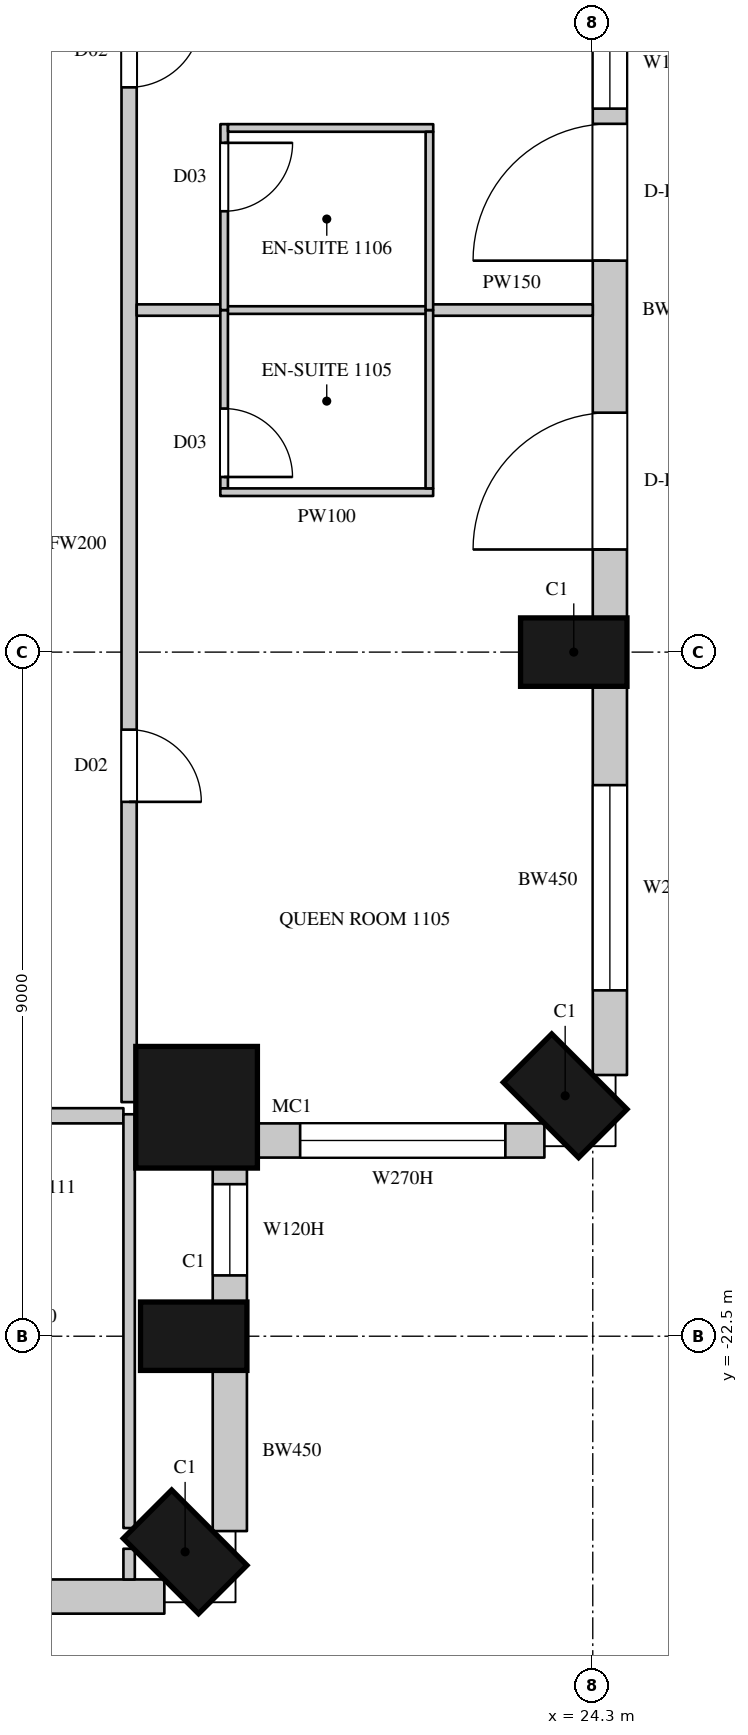
"""IFC4 building model, lengths in metres.
Left out: names, types, materials, properties, quantities, classifications, styles, units other than length and angle.
Written with IfcOpenShell. Run it as: python <this file> out.ifc"""

import sys

from ifc_helpers import new_model, si_unit, direction, frame, frame_2d, origin, origin_2d, place, context, subcontext, project, spatial, rectangle, circle, extrude, element, fill, save


model = new_model("IFC4")
c1 = context("Model", 3, precision=1e-05, world=origin(), true_north=direction((0.0, 1.0)))
c2 = subcontext(c1, "Body", "Model", "MODEL_VIEW")
j1 = project(units=[si_unit("LENGTHUNIT", "METRE"), si_unit("PLANEANGLEUNIT", "RADIAN")], contexts=[c1])
p1 = place(None, origin())
s1 = spatial("IfcSite", under=j1, at=p1, CompositionType="ELEMENT")
p2 = place(p1, origin())
s2 = spatial("IfcBuilding", under=s1, at=p2, CompositionType="ELEMENT")
p3 = place(p2, frame((0.0, 0.0, 69.9)))
s3 = spatial("IfcBuildingStorey", under=s2, at=p3, CompositionType="ELEMENT", Elevation=69.9)
for number, where, z_axis, x_axis in (
    (1, (18.937, -25.337, 0.0), (0.0, 0.0, 1.0), (0.707, 0.707, 0.0)),
    (2, (19.05, -22.5, 0.0), (0.0, 0.0, 1.0), (0.0, 1.0, 0.0)),
):
    element("IfcColumn", number, at=place(p3, frame(where, z_axis=z_axis, x_axis=x_axis)), inside=s3, PredefinedType="COLUMN", context=c2, shape_type="SweptSolid", body=[
        extrude(rectangle(XDim=0.9, YDim=1.4, at=origin_2d()), origin(), (0.0, 0.0, 1.0), 3.6),
    ])
p4 = place(p3, frame((19.088, -19.488, 0.0), z_axis=(0.0, 0.0, 1.0), x_axis=(1.0, 0.0, 0.0)))
e3 = element("IfcColumn", 3, at=p4, inside=s3, PredefinedType="COLUMN", context=c2, shape_type="SweptSolid", body=[
    extrude(circle(Radius=0.8, at=origin_2d()), origin(), (0.0, 0.0, 1.0), 3.6),
])
for number, where, z_axis, x_axis in (
    (4, (23.937, -19.337, 0.0), (0.0, 0.0, 1.0), (0.707, 0.707, 0.0)),
    (5, (24.05, -13.5, 0.0), (0.0, 0.0, 1.0), (0.0, 1.0, 0.0)),
):
    element("IfcColumn", number, at=place(p3, frame(where, z_axis=z_axis, x_axis=x_axis)), inside=s3, PredefinedType="COLUMN", context=c2, shape_type="SweptSolid", body=[
        extrude(rectangle(XDim=0.9, YDim=1.4, at=origin_2d()), origin(), (0.0, 0.0, 1.0), 3.6),
    ])
p5 = place(p3, frame((15.75, -25.925, 0.0), z_axis=(0.0, 0.0, 1.0), x_axis=(1.0, 0.0, 0.0)))
e6 = element("IfcWall", 6, at=p5, inside=s3, PredefinedType="SOLIDWALL", context=c2, shape_type="SweptSolid", body=[
    extrude(rectangle(XDim=2.914, YDim=0.45, at=frame_2d((1.457, 0.0))), origin(), (0.0, 0.0, 1.0), 3.3),
])
p6 = place(p3, frame((19.525, -25.064, 0.0), z_axis=(0.0, 0.0, 1.0), x_axis=(0.0, 1.0, 0.0)))
e7 = element("IfcWall", 7, at=p6, inside=s3, PredefinedType="SOLIDWALL", context=c2, shape_type="SweptSolid", body=[
    extrude(rectangle(XDim=2.114, YDim=0.45, at=frame_2d((1.057, 0.0))), origin(), (0.0, 0.0, 1.0), 3.3),
])
p7 = place(p3, frame((19.525, -22.05, 0.0), z_axis=(0.0, 0.0, 1.0), x_axis=(0.0, 1.0, 0.0)))
e8 = element("IfcWall", 8, at=p7, inside=s3, PredefinedType="SOLIDWALL", context=c2, shape_type="SweptSolid", body=[
    extrude(rectangle(XDim=1.792, YDim=0.45, at=frame_2d((0.896, 0.0))), origin(), (0.0, 0.0, 1.0), 3.3),
])
p8 = place(p7, frame((0.35, 0.0, 1.05)))
e9 = element("IfcOpeningElement", 9, at=p8, cuts=e8, PredefinedType="OPENING", context=c2, shape_type="SweptSolid", body=[
    extrude(rectangle(XDim=1.2, YDim=2.0, at=frame_2d((0.6, 1.0))), frame((0.0, 0.235, 0.0), z_axis=(0.0, -1.0, 0.0), x_axis=(1.0, 0.0, 0.0)), (0.0, 0.0, 1.0), 0.47),
])
p9 = place(p3, frame((19.858, -19.925, 0.0), z_axis=(0.0, 0.0, 1.0), x_axis=(1.0, 0.0, 0.0)))
e10 = element("IfcWall", 10, at=p9, inside=s3, PredefinedType="SOLIDWALL", context=c2, shape_type="SweptSolid", body=[
    extrude(rectangle(XDim=3.805, YDim=0.45, at=frame_2d((1.903, 0.0))), origin(), (0.0, 0.0, 1.0), 3.3),
])
p10 = place(p9, frame((0.592, 0.0, 1.05)))
e11 = element("IfcOpeningElement", 11, at=p10, cuts=e10, PredefinedType="OPENING", context=c2, shape_type="SweptSolid", body=[
    extrude(rectangle(XDim=2.7, YDim=2.0, at=frame_2d((1.35, 1.0))), frame((0.0, 0.235, 0.0), z_axis=(0.0, -1.0, 0.0), x_axis=(1.0, 0.0, 0.0)), (0.0, 0.0, 1.0), 0.47),
])
p11 = place(p3, frame((24.525, -19.064, 0.0), z_axis=(0.0, 0.0, 1.0), x_axis=(0.0, 1.0, 0.0)))
e12 = element("IfcWall", 12, at=p11, inside=s3, PredefinedType="SOLIDWALL", context=c2, shape_type="SweptSolid", body=[
    extrude(rectangle(XDim=5.114, YDim=0.45, at=frame_2d((2.557, 0.0))), origin(), (0.0, 0.0, 1.0), 3.3),
])
p12 = place(p11, frame((1.114, 0.0, 1.05)))
e13 = element("IfcOpeningElement", 13, at=p12, cuts=e12, PredefinedType="OPENING", context=c2, shape_type="SweptSolid", body=[
    extrude(rectangle(XDim=2.7, YDim=2.0, at=frame_2d((1.35, 1.0))), frame((0.0, 0.235, 0.0), z_axis=(0.0, -1.0, 0.0), x_axis=(1.0, 0.0, 0.0)), (0.0, 0.0, 1.0), 0.47),
])
p13 = place(p3, frame((24.525, -13.05, 0.0), z_axis=(0.0, 0.0, 1.0), x_axis=(0.0, 1.0, 0.0)))
e14 = element("IfcWall", 14, at=p13, inside=s3, PredefinedType="SOLIDWALL", context=c2, shape_type="SweptSolid", body=[
    extrude(rectangle(XDim=8.1, YDim=0.45, at=frame_2d((4.05, 0.0))), origin(), (0.0, 0.0, 1.0), 3.3),
])
p14 = place(p13, frame((0.9, 0.0, 0.0)))
e15 = element("IfcOpeningElement", 15, at=p14, cuts=e14, PredefinedType="OPENING", context=c2, shape_type="SweptSolid", body=[
    extrude(rectangle(XDim=1.8, YDim=2.4, at=frame_2d((0.9, 1.2))), frame((0.0, 0.235, 0.0), z_axis=(0.0, -1.0, 0.0), x_axis=(1.0, 0.0, 0.0)), (0.0, 0.0, 1.0), 0.47),
])
p15 = place(p13, frame((4.7, 0.0, 0.0)))
e16 = element("IfcOpeningElement", 16, at=p15, cuts=e14, PredefinedType="OPENING", context=c2, shape_type="SweptSolid", body=[
    extrude(rectangle(XDim=1.8, YDim=2.4, at=frame_2d((0.9, 1.2))), frame((0.0, 0.235, 0.0), z_axis=(0.0, -1.0, 0.0), x_axis=(1.0, 0.0, 0.0)), (0.0, 0.0, 1.0), 0.47),
])
p16 = place(p13, frame((6.7, 0.0, 1.05)))
e17 = element("IfcOpeningElement", 17, at=p16, cuts=e14, PredefinedType="OPENING", context=c2, shape_type="SweptSolid", body=[
    extrude(rectangle(XDim=1.2, YDim=2.0, at=frame_2d((0.6, 1.0))), frame((0.0, 0.235, 0.0), z_axis=(0.0, -1.0, 0.0), x_axis=(1.0, 0.0, 0.0)), (0.0, 0.0, 1.0), 0.47),
])
p17 = place(p3, frame((-20.7, -19.6, 0.0), z_axis=(0.0, 0.0, 1.0), x_axis=(1.0, 0.0, 0.0)))
e18 = element("IfcWall", 18, at=p17, inside=s3, PredefinedType="PARTITIONING", context=c2, shape_type="SweptSolid", body=[
    extrude(rectangle(XDim=38.825, YDim=0.2, at=frame_2d((19.413, 0.0))), origin(), (0.0, 0.0, 1.0), 3.3),
])
p18 = place(p17, frame((3.15, 0.0, 0.0)))
e19 = element("IfcOpeningElement", 19, at=p18, cuts=e18, PredefinedType="OPENING", context=c2, shape_type="SweptSolid", body=[
    extrude(rectangle(XDim=0.95, YDim=2.2, at=frame_2d((0.475, 1.1))), frame((0.0, 0.11, 0.0), z_axis=(0.0, -1.0, 0.0), x_axis=(1.0, 0.0, 0.0)), (0.0, 0.0, 1.0), 0.22),
])
p19 = place(p17, frame((13.9, 0.0, 0.0)))
e20 = element("IfcOpeningElement", 20, at=p19, cuts=e18, PredefinedType="OPENING", context=c2, shape_type="SweptSolid", body=[
    extrude(rectangle(XDim=0.95, YDim=2.2, at=frame_2d((0.475, 1.1))), frame((0.0, 0.11, 0.0), z_axis=(0.0, -1.0, 0.0), x_axis=(1.0, 0.0, 0.0)), (0.0, 0.0, 1.0), 0.22),
])
p20 = place(p17, frame((21.15, 0.0, 0.0)))
e21 = element("IfcOpeningElement", 21, at=p20, cuts=e18, PredefinedType="OPENING", context=c2, shape_type="SweptSolid", body=[
    extrude(rectangle(XDim=0.95, YDim=2.2, at=frame_2d((0.475, 1.1))), frame((0.0, 0.11, 0.0), z_axis=(0.0, -1.0, 0.0), x_axis=(1.0, 0.0, 0.0)), (0.0, 0.0, 1.0), 0.22),
])
p21 = place(p17, frame((29.75, 0.0, 0.0)))
e22 = element("IfcOpeningElement", 22, at=p21, cuts=e18, PredefinedType="OPENING", context=c2, shape_type="SweptSolid", body=[
    extrude(rectangle(XDim=1.1, YDim=2.4, at=frame_2d((0.55, 1.2))), frame((0.0, 0.11, 0.0), z_axis=(0.0, -1.0, 0.0), x_axis=(1.0, 0.0, 0.0)), (0.0, 0.0, 1.0), 0.22),
])
p22 = place(p3, frame((18.2, -19.42, 0.0), z_axis=(0.0, 0.0, 1.0), x_axis=(0.0, 1.0, 0.0)))
e23 = element("IfcWall", 23, at=p22, inside=s3, PredefinedType="PARTITIONING", context=c2, shape_type="SweptSolid", body=[
    extrude(rectangle(XDim=14.67, YDim=0.2, at=frame_2d((7.335, 0.0))), origin(), (0.0, 0.0, 1.0), 3.3),
])
p23 = place(p22, frame((3.95, 0.0, 0.0)))
e24 = element("IfcOpeningElement", 24, at=p23, cuts=e23, PredefinedType="OPENING", context=c2, shape_type="SweptSolid", body=[
    extrude(rectangle(XDim=0.95, YDim=2.2, at=frame_2d((0.475, 1.1))), frame((0.0, 0.11, 0.0), z_axis=(0.0, -1.0, 0.0), x_axis=(1.0, 0.0, 0.0)), (0.0, 0.0, 1.0), 0.22),
])
p24 = place(p22, frame((13.35, 0.0, 0.0)))
e25 = element("IfcOpeningElement", 25, at=p24, cuts=e23, PredefinedType="OPENING", context=c2, shape_type="SweptSolid", body=[
    extrude(rectangle(XDim=0.95, YDim=2.2, at=frame_2d((0.475, 1.1))), frame((0.0, 0.11, 0.0), z_axis=(0.0, -1.0, 0.0), x_axis=(1.0, 0.0, 0.0)), (0.0, 0.0, 1.0), 0.22),
])
p25 = place(p3, frame((18.2, -25.7, 0.0), z_axis=(0.0, 0.0, 1.0), x_axis=(0.0, 1.0, 0.0)))
e26 = element("IfcWall", 26, at=p25, inside=s3, PredefinedType="PARTITIONING", context=c2, shape_type="SweptSolid", body=[
    extrude(rectangle(XDim=0.404, YDim=0.15, at=frame_2d((0.202, 0.0))), origin(), (0.0, 0.0, 1.0), 3.3),
])
p26 = place(p3, frame((18.2, -25.024, 0.0), z_axis=(0.0, 0.0, 1.0), x_axis=(0.0, 1.0, 0.0)))
e27 = element("IfcWall", 27, at=p26, inside=s3, PredefinedType="PARTITIONING", context=c2, shape_type="SweptSolid", body=[
    extrude(rectangle(XDim=5.444, YDim=0.15, at=frame_2d((2.722, 0.0))), origin(), (0.0, 0.0, 1.0), 3.3),
])
p27 = place(p3, frame((18.3, -9.0, 0.0), z_axis=(0.0, 0.0, 1.0), x_axis=(1.0, 0.0, 0.0)))
e28 = element("IfcWall", 28, at=p27, inside=s3, PredefinedType="PARTITIONING", context=c2, shape_type="SweptSolid", body=[
    extrude(rectangle(XDim=1.13, YDim=0.15, at=frame_2d((0.565, 0.0))), origin(), (0.0, 0.0, 1.0), 2.65),
])
p28 = place(p3, frame((22.17, -9.0, 0.0), z_axis=(0.0, 0.0, 1.0), x_axis=(1.0, 0.0, 0.0)))
e29 = element("IfcWall", 29, at=p28, inside=s3, PredefinedType="PARTITIONING", context=c2, shape_type="SweptSolid", body=[
    extrude(rectangle(XDim=2.13, YDim=0.15, at=frame_2d((1.065, 0.0))), origin(), (0.0, 0.0, 1.0), 2.65),
])
p29 = place(p3, frame((19.43, -9.0, 0.0), z_axis=(0.0, 0.0, 1.0), x_axis=(1.0, 0.0, 0.0)))
e30 = element("IfcWall", 30, at=p29, inside=s3, PredefinedType="PARTITIONING", context=c2, shape_type="SweptSolid", body=[
    extrude(rectangle(XDim=2.74, YDim=0.1, at=frame_2d((1.37, 0.0))), origin(), (0.0, 0.0, 1.0), 2.65),
])
p30 = place(p3, frame((19.45, -11.346, 0.0), z_axis=(0.0, 0.0, 1.0), x_axis=(0.0, 1.0, 0.0)))
e31 = element("IfcWall", 31, at=p30, inside=s3, PredefinedType="PARTITIONING", context=c2, shape_type="SweptSolid", body=[
    extrude(rectangle(XDim=2.346, YDim=0.1, at=frame_2d((1.173, 0.0))), origin(), (0.0, 0.0, 1.0), 3.3),
])
p31 = place(p30, frame((0.15, 0.0, 0.0)))
e32 = element("IfcOpeningElement", 32, at=p31, cuts=e31, PredefinedType="OPENING", context=c2, shape_type="SweptSolid", body=[
    extrude(rectangle(XDim=0.9, YDim=2.2, at=frame_2d((0.45, 1.1))), frame((0.0, 0.06, 0.0), z_axis=(0.0, -1.0, 0.0), x_axis=(1.0, 0.0, 0.0)), (0.0, 0.0, 1.0), 0.12),
])
p32 = place(p3, frame((19.4, -11.396, 0.0), z_axis=(0.0, 0.0, 1.0), x_axis=(1.0, 0.0, 0.0)))
e33 = element("IfcWall", 33, at=p32, inside=s3, PredefinedType="PARTITIONING", context=c2, shape_type="SweptSolid", body=[
    extrude(rectangle(XDim=2.8, YDim=0.1, at=frame_2d((1.4, 0.0))), origin(), (0.0, 0.0, 1.0), 3.3),
])
p33 = place(p3, frame((19.45, -9.0, 0.0), z_axis=(0.0, 0.0, 1.0), x_axis=(0.000399241409, 0.999999920303, 0.0)))
e34 = element("IfcWall", 34, at=p33, inside=s3, PredefinedType="PARTITIONING", context=c2, shape_type="SweptSolid", body=[
    extrude(rectangle(XDim=2.446, YDim=0.1, at=frame_2d((1.223, 0.0))), origin(), (0.0, 0.0, 1.0), 3.3),
])
p34 = place(p33, frame((1.3, 0.0, 0.0)))
e35 = element("IfcOpeningElement", 35, at=p34, cuts=e34, PredefinedType="OPENING", context=c2, shape_type="SweptSolid", body=[
    extrude(rectangle(XDim=0.9, YDim=2.2, at=frame_2d((0.45, 1.1))), frame((0.0, 0.06, 0.0), z_axis=(0.0, -1.0, 0.0), x_axis=(1.0, 0.0, 0.0)), (0.0, 0.0, 1.0), 0.12),
])
p35 = place(p3, frame((19.501, -6.604, 0.0), z_axis=(0.0, 0.0, 1.0), x_axis=(0.999999934588, -0.000361696332, 0.0)))
e36 = element("IfcWall", 36, at=p35, inside=s3, PredefinedType="PARTITIONING", context=c2, shape_type="SweptSolid", body=[
    extrude(rectangle(XDim=2.7, YDim=0.1, at=frame_2d((1.35, 0.0))), origin(), (0.0, 0.0, 1.0), 3.3),
])
p36 = place(p3, frame((22.15, -11.346, 0.0), z_axis=(0.0, 0.0, 1.0), x_axis=(0.0, 1.0, 0.0)))
e37 = element("IfcWall", 37, at=p36, inside=s3, PredefinedType="PARTITIONING", context=c2, shape_type="SweptSolid", body=[
    extrude(rectangle(XDim=2.346, YDim=0.1, at=frame_2d((1.173, 0.0))), origin(), (0.0, 0.0, 1.0), 3.3),
])
p37 = place(p3, frame((22.15, -9.0, 0.0), z_axis=(0.0, 0.0, 1.0), x_axis=(0.00041644973, 0.999999913285, 0.0)))
e38 = element("IfcWall", 38, at=p37, inside=s3, PredefinedType="PARTITIONING", context=c2, shape_type="SweptSolid", body=[
    extrude(rectangle(XDim=2.345, YDim=0.1, at=frame_2d((1.172, 0.0))), origin(), (0.0, 0.0, 1.0), 3.3),
])
p38 = place(p8, origin())
e39 = element("IfcWindow", 39, at=p38, inside=s3, PartitioningType="SINGLE_PANEL", PredefinedType="WINDOW", context=c2, shape_type="SweptSolid", body=[
    extrude(rectangle(XDim=1.2, YDim=2.0, at=frame_2d((0.6, 1.0))), frame((0.0, 0.135, 0.0), z_axis=(0.0, -1.0, 0.0), x_axis=(1.0, 0.0, 0.0)), (0.0, 0.0, 1.0), 0.06),
])
fill(e9, e39)
p39 = place(p10, origin())
e40 = element("IfcWindow", 40, at=p39, inside=s3, PartitioningType="SINGLE_PANEL", PredefinedType="WINDOW", context=c2, shape_type="SweptSolid", body=[
    extrude(rectangle(XDim=2.7, YDim=2.0, at=frame_2d((1.35, 1.0))), frame((0.0, 0.135, 0.0), z_axis=(0.0, -1.0, 0.0), x_axis=(1.0, 0.0, 0.0)), (0.0, 0.0, 1.0), 0.06),
])
fill(e11, e40)
p40 = place(p12, origin())
e41 = element("IfcWindow", 41, at=p40, inside=s3, PartitioningType="SINGLE_PANEL", PredefinedType="WINDOW", context=c2, shape_type="SweptSolid", body=[
    extrude(rectangle(XDim=2.7, YDim=2.0, at=frame_2d((1.35, 1.0))), frame((0.0, 0.135, 0.0), z_axis=(0.0, -1.0, 0.0), x_axis=(1.0, 0.0, 0.0)), (0.0, 0.0, 1.0), 0.06),
])
fill(e13, e41)
p41 = place(p14, origin())
e42 = element("IfcDoor", 42, at=p41, inside=s3, OperationType="SLIDING_TO_LEFT", PredefinedType="DOOR", context=c2, shape_type="SweptSolid", body=[
    extrude(rectangle(XDim=1.8, YDim=2.4, at=frame_2d((0.9, 1.2))), frame((0.0, 0.13, 0.0), z_axis=(0.0, -1.0, 0.0), x_axis=(1.0, 0.0, 0.0)), (0.0, 0.0, 1.0), 0.05),
])
fill(e15, e42)
p42 = place(p15, origin())
e43 = element("IfcDoor", 43, at=p42, inside=s3, OperationType="SLIDING_TO_LEFT", PredefinedType="DOOR", context=c2, shape_type="SweptSolid", body=[
    extrude(rectangle(XDim=1.8, YDim=2.4, at=frame_2d((0.9, 1.2))), frame((0.0, 0.13, 0.0), z_axis=(0.0, -1.0, 0.0), x_axis=(1.0, 0.0, 0.0)), (0.0, 0.0, 1.0), 0.05),
])
fill(e16, e43)
p43 = place(p16, origin())
e44 = element("IfcWindow", 44, at=p43, inside=s3, PartitioningType="SINGLE_PANEL", PredefinedType="WINDOW", context=c2, shape_type="SweptSolid", body=[
    extrude(rectangle(XDim=1.2, YDim=2.0, at=frame_2d((0.6, 1.0))), frame((0.0, 0.135, 0.0), z_axis=(0.0, -1.0, 0.0), x_axis=(1.0, 0.0, 0.0)), (0.0, 0.0, 1.0), 0.06),
])
fill(e17, e44)
p44 = place(p23, origin())
e45 = element("IfcDoor", 45, at=p44, inside=s3, OperationType="SINGLE_SWING_RIGHT", PredefinedType="DOOR", context=c2, shape_type="SweptSolid", body=[
    extrude(rectangle(XDim=0.95, YDim=2.2, at=frame_2d((0.475, 1.1))), frame((0.0, 0.025, 0.0), z_axis=(0.0, -1.0, 0.0), x_axis=(1.0, 0.0, 0.0)), (0.0, 0.0, 1.0), 0.05),
])
fill(e24, e45)
p45 = place(p31, origin())
e46 = element("IfcDoor", 46, at=p45, inside=s3, OperationType="SINGLE_SWING_RIGHT", PredefinedType="DOOR", context=c2, shape_type="SweptSolid", body=[
    extrude(rectangle(XDim=0.9, YDim=2.2, at=frame_2d((0.45, 1.1))), frame((0.0, 0.025, 0.0), z_axis=(0.0, -1.0, 0.0), x_axis=(1.0, 0.0, 0.0)), (0.0, 0.0, 1.0), 0.05),
])
fill(e32, e46)
p46 = place(p24, origin())
e47 = element("IfcDoor", 47, at=p46, inside=s3, OperationType="SINGLE_SWING_LEFT", PredefinedType="DOOR", context=c2, shape_type="SweptSolid", body=[
    extrude(rectangle(XDim=0.95, YDim=2.2, at=frame_2d((0.475, 1.1))), frame((0.0, 0.025, 0.0), z_axis=(0.0, -1.0, 0.0), x_axis=(1.0, 0.0, 0.0)), (0.0, 0.0, 1.0), 0.05),
])
fill(e25, e47)
p47 = place(p34, origin())
e48 = element("IfcDoor", 48, at=p47, inside=s3, OperationType="SINGLE_SWING_LEFT", PredefinedType="DOOR", context=c2, shape_type="SweptSolid", body=[
    extrude(rectangle(XDim=0.9, YDim=2.2, at=frame_2d((0.45, 1.1))), frame((0.0, 0.025, 0.0), z_axis=(0.0, -1.0, 0.0), x_axis=(1.0, 0.0, 0.0)), (0.0, 0.0, 1.0), 0.05),
])
fill(e35, e48)
save(model, sys.argv[1])
